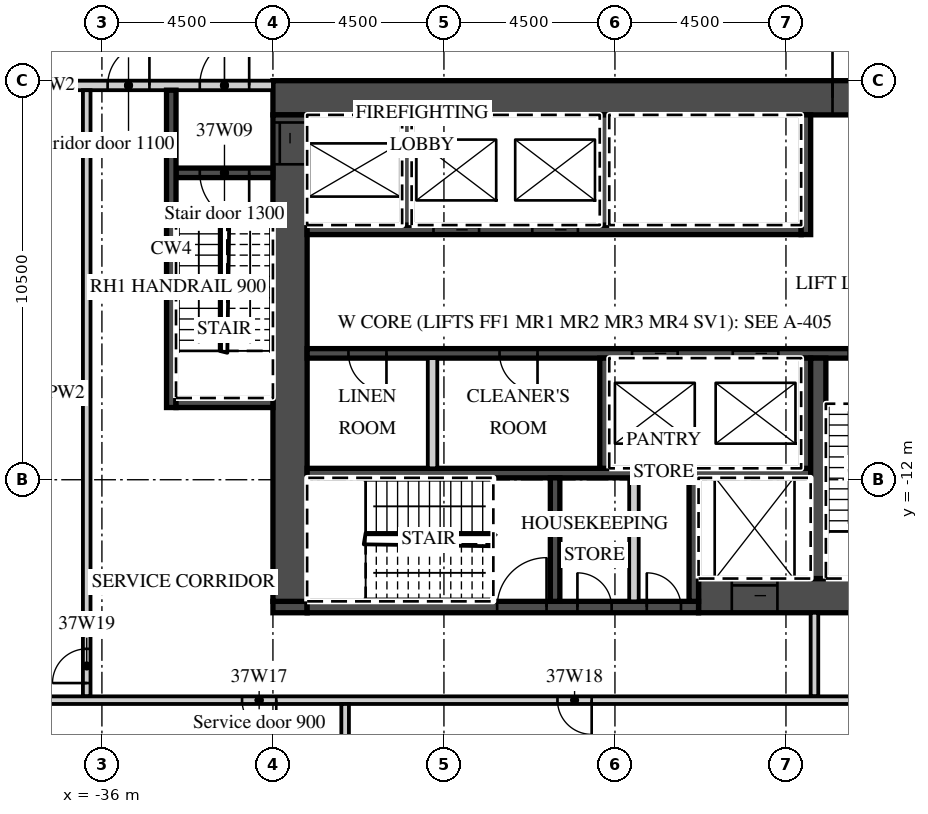
"""IFC4 building model, lengths in metres.
Left out: names, types, materials, properties, quantities, classifications, styles, units other than length and angle.
Written with IfcOpenShell. Run it as: python <this file> out.ifc"""

import sys

from ifc_helpers import new_model, si_unit, direction, frame, frame_2d, origin, place, context, subcontext, project, spatial, rectangle, extrude, element, fill, save


model = new_model("IFC4")
c1 = context("Model", 3, precision=1e-05, world=origin(), true_north=direction((0.0, 1.0)))
c2 = subcontext(c1, "Body", "Model", "MODEL_VIEW")
j1 = project(units=[si_unit("LENGTHUNIT", "METRE"), si_unit("PLANEANGLEUNIT", "RADIAN")], contexts=[c1])
p1 = place(None, origin())
s1 = spatial("IfcSite", under=j1, at=p1, CompositionType="ELEMENT")
p2 = place(p1, origin())
s2 = spatial("IfcBuilding", under=s1, at=p2, CompositionType="ELEMENT")
p3 = place(p2, frame((0.0, 0.0, 162.4)))
s3 = spatial("IfcBuildingStorey", under=s2, at=p3, CompositionType="ELEMENT", Elevation=162.4)
p4 = place(p3, frame((-31.5, -1.95, 0.0), z_axis=(0.0, 0.0, 1.0), x_axis=(1.0, 0.0, 0.0)))
e1 = element("IfcWall", 1, at=p4, inside=s3, PredefinedType="SHEAR", context=c2, shape_type="SweptSolid", body=[
    extrude(rectangle(XDim=18.0, YDim=0.9, at=frame_2d((9.0, 0.0))), origin(), (0.0, 0.0, 1.0), 4.22),
])
p5 = place(p4, frame((14.725, 0.0, 0.0)))
e2 = element("IfcOpeningElement", 2, at=p5, cuts=e1, PredefinedType="OPENING", context=c2, shape_type="SweptSolid", body=[
    extrude(rectangle(XDim=1.8, YDim=2.1, at=frame_2d((0.9, 1.05))), frame((0.0, 0.46, 0.0), z_axis=(0.0, -1.0, 0.0), x_axis=(1.0, 0.0, 0.0)), (0.0, 0.0, 1.0), 0.92),
])
p6 = place(p3, frame((-20.3, -15.05, 0.0), z_axis=(0.0, 0.0, 1.0), x_axis=(1.0, 0.0, 0.0)))
e3 = element("IfcWall", 3, at=p6, inside=s3, PredefinedType="SHEAR", context=c2, shape_type="SweptSolid", body=[
    extrude(rectangle(XDim=6.8, YDim=0.9, at=frame_2d((3.4, 0.0))), origin(), (0.0, 0.0, 1.0), 4.22),
])
p7 = place(p6, frame((0.875, 0.0, 0.0)))
e4 = element("IfcOpeningElement", 4, at=p7, cuts=e3, PredefinedType="OPENING", context=c2, shape_type="SweptSolid", body=[
    extrude(rectangle(XDim=1.2, YDim=2.1, at=frame_2d((0.6, 1.05))), frame((0.0, 0.46, 0.0), z_axis=(0.0, -1.0, 0.0), x_axis=(1.0, 0.0, 0.0)), (0.0, 0.0, 1.0), 0.92),
])
p8 = place(p3, frame((-31.5, -15.35, 0.0), z_axis=(0.0, 0.0, 1.0), x_axis=(1.0, 0.0, 0.0)))
e5 = element("IfcWall", 5, at=p8, inside=s3, PredefinedType="SHEAR", context=c2, shape_type="SweptSolid", body=[
    extrude(rectangle(XDim=0.9, YDim=0.3, at=frame_2d((0.45, 0.0))), origin(), (0.0, 0.0, 1.0), 4.22),
])
p9 = place(p3, frame((-30.6, -15.35, 0.0), z_axis=(0.0, 0.0, 1.0), x_axis=(1.0, 0.0, 0.0)))
e6 = element("IfcWall", 6, at=p9, inside=s3, PredefinedType="SHEAR", context=c2, shape_type="SweptSolid", body=[
    extrude(rectangle(XDim=10.3, YDim=0.3, at=frame_2d((5.15, 0.0))), origin(), (0.0, 0.0, 1.0), 4.22),
])
p10 = place(p9, frame((5.0, 0.0, 0.0)))
e7 = element("IfcOpeningElement", 7, at=p10, cuts=e6, PredefinedType="OPENING", context=c2, shape_type="SweptSolid", body=[
    extrude(rectangle(XDim=1.3, YDim=2.1, at=frame_2d((0.65, 1.05))), frame((0.0, 0.16, 0.0), z_axis=(0.0, -1.0, 0.0), x_axis=(1.0, 0.0, 0.0)), (0.0, 0.0, 1.0), 0.32),
])
p11 = place(p9, frame((7.113, 0.0, 0.0)))
e8 = element("IfcOpeningElement", 8, at=p11, cuts=e6, PredefinedType="OPENING", context=c2, shape_type="SweptSolid", body=[
    extrude(rectangle(XDim=0.9, YDim=2.1, at=frame_2d((0.45, 1.05))), frame((0.0, 0.16, 0.0), z_axis=(0.0, -1.0, 0.0), x_axis=(1.0, 0.0, 0.0)), (0.0, 0.0, 1.0), 0.32),
])
p12 = place(p9, frame((8.938, 0.0, 0.0)))
e9 = element("IfcOpeningElement", 9, at=p12, cuts=e6, PredefinedType="OPENING", context=c2, shape_type="SweptSolid", body=[
    extrude(rectangle(XDim=0.9, YDim=2.1, at=frame_2d((0.45, 1.05))), frame((0.0, 0.16, 0.0), z_axis=(0.0, -1.0, 0.0), x_axis=(1.0, 0.0, 0.0)), (0.0, 0.0, 1.0), 0.32),
])
p13 = place(p3, frame((-31.05, -15.2, 0.0), z_axis=(0.0, 0.0, 1.0), x_axis=(0.0, 1.0, 0.0)))
e10 = element("IfcWall", 10, at=p13, inside=s3, PredefinedType="SHEAR", context=c2, shape_type="SweptSolid", body=[
    extrude(rectangle(XDim=12.8, YDim=0.9, at=frame_2d((6.4, 0.0))), origin(), (0.0, 0.0, 1.0), 4.22),
])
p14 = place(p13, frame((11.5, 0.0, 0.0)))
e11 = element("IfcOpeningElement", 11, at=p14, cuts=e10, PredefinedType="OPENING", context=c2, shape_type="SweptSolid", body=[
    extrude(rectangle(XDim=1.1, YDim=2.1, at=frame_2d((0.55, 1.05))), frame((0.0, 0.46, 0.0), z_axis=(0.0, -1.0, 0.0), x_axis=(1.0, 0.0, 0.0)), (0.0, 0.0, 1.0), 0.92),
])
p15 = place(p3, frame((-30.6, -5.425, 0.0), z_axis=(0.0, 0.0, 1.0), x_axis=(1.0, 0.0, 0.0)))
e12 = element("IfcWall", 12, at=p15, inside=s3, PredefinedType="SHEAR", context=c2, shape_type="SweptSolid", body=[
    extrude(rectangle(XDim=13.0, YDim=0.25, at=frame_2d((6.5, 0.0))), origin(), (0.0, 0.0, 1.0), 4.22),
])
p16 = place(p15, frame((3.325, 0.0, 0.0)))
e13 = element("IfcOpeningElement", 13, at=p16, cuts=e12, PredefinedType="OPENING", context=c2, shape_type="SweptSolid", body=[
    extrude(rectangle(XDim=1.2, YDim=2.1, at=frame_2d((0.6, 1.05))), frame((0.0, 0.135, 0.0), z_axis=(0.0, -1.0, 0.0), x_axis=(1.0, 0.0, 0.0)), (0.0, 0.0, 1.0), 0.27),
])
p17 = place(p15, frame((5.925, 0.0, 0.0)))
e14 = element("IfcOpeningElement", 14, at=p17, cuts=e12, PredefinedType="OPENING", context=c2, shape_type="SweptSolid", body=[
    extrude(rectangle(XDim=1.2, YDim=2.1, at=frame_2d((0.6, 1.05))), frame((0.0, 0.135, 0.0), z_axis=(0.0, -1.0, 0.0), x_axis=(1.0, 0.0, 0.0)), (0.0, 0.0, 1.0), 0.27),
])
p18 = place(p3, frame((-17.475, -5.55, 0.0), z_axis=(0.0, 0.0, 1.0), x_axis=(0.0, 1.0, 0.0)))
e15 = element("IfcWall", 15, at=p18, inside=s3, PredefinedType="SHEAR", context=c2, shape_type="SweptSolid", body=[
    extrude(rectangle(XDim=3.15, YDim=0.25, at=frame_2d((1.575, 0.0))), origin(), (0.0, 0.0, 1.0), 4.22),
])
for number, where, z_axis, x_axis in (
    (16, (-27.975, -5.3, 0.0), (0.0, 0.0, 1.0), (0.0, 1.0, 0.0)),
    (17, (-22.775, -5.3, 0.0), (0.0, 0.0, 1.0), (0.0, 1.0, 0.0)),
):
    element("IfcWall", number, at=place(p3, frame(where, z_axis=z_axis, x_axis=x_axis)), inside=s3, PredefinedType="SHEAR", context=c2, shape_type="SweptSolid", body=[
        extrude(rectangle(XDim=2.9, YDim=0.25, at=frame_2d((1.45, 0.0))), origin(), (0.0, 0.0, 1.0), 4.22),
    ])
p19 = place(p3, frame((-30.6, -8.675, 0.0), z_axis=(0.0, 0.0, 1.0), x_axis=(1.0, 0.0, 0.0)))
e18 = element("IfcWall", 18, at=p19, inside=s3, PredefinedType="SHEAR", context=c2, shape_type="SweptSolid", body=[
    extrude(rectangle(XDim=16.2, YDim=0.25, at=frame_2d((8.1, 0.0))), origin(), (0.0, 0.0, 1.0), 4.22),
])
p20 = place(p19, frame((8.55, 0.0, 0.0)))
e19 = element("IfcOpeningElement", 19, at=p20, cuts=e18, PredefinedType="OPENING", context=c2, shape_type="SweptSolid", body=[
    extrude(rectangle(XDim=1.2, YDim=2.1, at=frame_2d((0.6, 1.05))), frame((0.0, 0.135, 0.0), z_axis=(0.0, -1.0, 0.0), x_axis=(1.0, 0.0, 0.0)), (0.0, 0.0, 1.0), 0.27),
])
p21 = place(p19, frame((11.2, 0.0, 0.0)))
e20 = element("IfcOpeningElement", 20, at=p21, cuts=e18, PredefinedType="OPENING", context=c2, shape_type="SweptSolid", body=[
    extrude(rectangle(XDim=1.2, YDim=2.1, at=frame_2d((0.6, 1.05))), frame((0.0, 0.135, 0.0), z_axis=(0.0, -1.0, 0.0), x_axis=(1.0, 0.0, 0.0)), (0.0, 0.0, 1.0), 0.27),
])
p22 = place(p19, frame((14.25, 0.0, 0.0)))
e21 = element("IfcOpeningElement", 21, at=p22, cuts=e18, PredefinedType="OPENING", context=c2, shape_type="SweptSolid", body=[
    extrude(rectangle(XDim=1.3, YDim=2.1, at=frame_2d((0.65, 1.05))), frame((0.0, 0.135, 0.0), z_axis=(0.0, -1.0, 0.0), x_axis=(1.0, 0.0, 0.0)), (0.0, 0.0, 1.0), 0.27),
])
p23 = place(p19, frame((1.087, 0.0, 0.0)))
e22 = element("IfcOpeningElement", 22, at=p23, cuts=e18, PredefinedType="OPENING", context=c2, shape_type="SweptSolid", body=[
    extrude(rectangle(XDim=1.0, YDim=2.1, at=frame_2d((0.5, 1.05))), frame((0.0, 0.135, 0.0), z_axis=(0.0, -1.0, 0.0), x_axis=(1.0, 0.0, 0.0)), (0.0, 0.0, 1.0), 0.27),
])
p24 = place(p19, frame((5.062, 0.0, 0.0)))
e23 = element("IfcOpeningElement", 23, at=p24, cuts=e18, PredefinedType="OPENING", context=c2, shape_type="SweptSolid", body=[
    extrude(rectangle(XDim=1.0, YDim=2.1, at=frame_2d((0.5, 1.05))), frame((0.0, 0.135, 0.0), z_axis=(0.0, -1.0, 0.0), x_axis=(1.0, 0.0, 0.0)), (0.0, 0.0, 1.0), 0.27),
])
p25 = place(p3, frame((-30.6, -11.825, 0.0), z_axis=(0.0, 0.0, 1.0), x_axis=(1.0, 0.0, 0.0)))
e24 = element("IfcWall", 24, at=p25, inside=s3, PredefinedType="SHEAR", context=c2, shape_type="SweptSolid", body=[
    extrude(rectangle(XDim=13.25, YDim=0.25, at=frame_2d((6.625, 0.0))), origin(), (0.0, 0.0, 1.0), 4.22),
])
for number, where, z_axis, x_axis in (
    (25, (-17.475, -11.7, 0.0), (0.0, 0.0, 1.0), (0.0, 1.0, 0.0)),
    (26, (-22.775, -11.7, 0.0), (0.0, 0.0, 1.0), (0.0, 1.0, 0.0)),
):
    element("IfcWall", number, at=place(p3, frame(where, z_axis=z_axis, x_axis=x_axis)), inside=s3, PredefinedType="SHEAR", context=c2, shape_type="SweptSolid", body=[
        extrude(rectangle(XDim=2.9, YDim=0.25, at=frame_2d((1.45, 0.0))), origin(), (0.0, 0.0, 1.0), 4.22),
    ])
p26 = place(p3, frame((-27.3, -11.7, 0.0), z_axis=(0.0, 0.0, 1.0), x_axis=(0.0, 1.0, 0.0)))
e27 = element("IfcWall", 27, at=p26, inside=s3, PredefinedType="PARTITIONING", context=c2, shape_type="SweptSolid", body=[
    extrude(rectangle(XDim=2.9, YDim=0.25, at=frame_2d((1.45, 0.0))), origin(), (0.0, 0.0, 1.0), 4.22),
])
p27 = place(p3, frame((-17.15, -14.6, 0.0), z_axis=(0.0, 0.0, 1.0), x_axis=(0.0, 1.0, 0.0)))
e28 = element("IfcWall", 28, at=p27, inside=s3, PredefinedType="SHEAR", context=c2, shape_type="SweptSolid", body=[
    extrude(rectangle(XDim=5.8, YDim=0.4, at=frame_2d((2.9, 0.0))), origin(), (0.0, 0.0, 1.0), 4.22),
])
for number, where, z_axis, x_axis in (
    (29, (-20.425, -15.2, 0.0), (0.0, 0.0, 1.0), (0.0, 1.0, 0.0)),
    (30, (-24.075, -15.2, 0.0), (0.0, 0.0, 1.0), (0.0, 1.0, 0.0)),
):
    element("IfcWall", number, at=place(p3, frame(where, z_axis=z_axis, x_axis=x_axis)), inside=s3, PredefinedType="SHEAR", context=c2, shape_type="SweptSolid", body=[
        extrude(rectangle(XDim=3.25, YDim=0.25, at=frame_2d((1.625, 0.0))), origin(), (0.0, 0.0, 1.0), 4.22),
    ])
p28 = place(p3, frame((-22.0, -15.2, 0.0), z_axis=(0.0, 0.0, 1.0), x_axis=(0.0, 1.0, 0.0)))
e31 = element("IfcWall", 31, at=p28, inside=s3, PredefinedType="PARTITIONING", context=c2, shape_type="SweptSolid", body=[
    extrude(rectangle(XDim=3.25, YDim=0.25, at=frame_2d((1.625, 0.0))), origin(), (0.0, 0.0, 1.0), 4.22),
])
p29 = place(p3, frame((-42.933, -1.625, 0.0), z_axis=(0.0, 0.0, 1.0), x_axis=(1.0, 0.0, 0.0)))
e32 = element("IfcWall", 32, at=p29, inside=s3, PredefinedType="PARTITIONING", context=c2, shape_type="SweptSolid", body=[
    extrude(rectangle(XDim=11.433, YDim=0.25, at=frame_2d((5.716, 0.0))), origin(), (0.0, 0.0, 1.0), 4.22),
])
p30 = place(p29, frame((9.508, 0.0, 0.0)))
e33 = element("IfcOpeningElement", 33, at=p30, cuts=e32, PredefinedType="OPENING", context=c2, shape_type="SweptSolid", body=[
    extrude(rectangle(XDim=1.3, YDim=2.1, at=frame_2d((0.65, 1.05))), frame((0.0, 0.135, 0.0), z_axis=(0.0, -1.0, 0.0), x_axis=(1.0, 0.0, 0.0)), (0.0, 0.0, 1.0), 0.27),
])
p31 = place(p29, frame((7.083, 0.0, 0.0)))
e34 = element("IfcOpeningElement", 34, at=p31, cuts=e32, PredefinedType="OPENING", context=c2, shape_type="SweptSolid", body=[
    extrude(rectangle(XDim=1.1, YDim=2.1, at=frame_2d((0.55, 1.05))), frame((0.0, 0.135, 0.0), z_axis=(0.0, -1.0, 0.0), x_axis=(1.0, 0.0, 0.0)), (0.0, 0.0, 1.0), 0.27),
])
p32 = place(p3, frame((-34.05, -3.925, 0.0), z_axis=(0.0, 0.0, 1.0), x_axis=(1.0, 0.0, 0.0)))
e35 = element("IfcWall", 35, at=p32, inside=s3, PredefinedType="SHEAR", context=c2, shape_type="SweptSolid", body=[
    extrude(rectangle(XDim=2.55, YDim=0.25, at=frame_2d((1.275, 0.0))), origin(), (0.0, 0.0, 1.0), 4.22),
])
p33 = place(p32, frame((0.625, 0.0, 0.0)))
e36 = element("IfcOpeningElement", 36, at=p33, cuts=e35, PredefinedType="OPENING", context=c2, shape_type="SweptSolid", body=[
    extrude(rectangle(XDim=1.3, YDim=2.1, at=frame_2d((0.65, 1.05))), frame((0.0, 0.135, 0.0), z_axis=(0.0, -1.0, 0.0), x_axis=(1.0, 0.0, 0.0)), (0.0, 0.0, 1.0), 0.27),
])
p34 = place(p3, frame((-34.175, -10.1, 0.0), z_axis=(0.0, 0.0, 1.0), x_axis=(0.0, 1.0, 0.0)))
e37 = element("IfcWall", 37, at=p34, inside=s3, PredefinedType="SHEAR", context=c2, shape_type="SweptSolid", body=[
    extrude(rectangle(XDim=8.35, YDim=0.25, at=frame_2d((4.175, 0.0))), origin(), (0.0, 0.0, 1.0), 4.22),
])
p35 = place(p3, frame((-34.05, -9.975, 0.0), z_axis=(0.0, 0.0, 1.0), x_axis=(1.0, 0.0, 0.0)))
e38 = element("IfcWall", 38, at=p35, inside=s3, PredefinedType="SHEAR", context=c2, shape_type="SweptSolid", body=[
    extrude(rectangle(XDim=2.55, YDim=0.25, at=frame_2d((1.275, 0.0))), origin(), (0.0, 0.0, 1.0), 4.22),
])
p36 = place(p3, frame((-17.25, -17.7, 0.0), z_axis=(0.0, 0.0, 1.0), x_axis=(0.0, 1.0, 0.0)))
e39 = element("IfcWall", 39, at=p36, inside=s3, PredefinedType="PARTITIONING", context=c2, shape_type="SweptSolid", body=[
    extrude(rectangle(XDim=2.2, YDim=0.2, at=frame_2d((1.1, 0.0))), origin(), (0.0, 0.0, 1.0), 4.22),
])
p37 = place(p3, frame((-36.4, -17.7, 0.0), z_axis=(0.0, 0.0, 1.0), x_axis=(0.0, 1.0, 0.0)))
e40 = element("IfcWall", 40, at=p37, inside=s3, PredefinedType="PARTITIONING", context=c2, shape_type="SweptSolid", body=[
    extrude(rectangle(XDim=15.95, YDim=0.2, at=frame_2d((7.975, 0.0))), origin(), (0.0, 0.0, 1.0), 4.22),
])
p38 = place(p37, frame((0.35, 0.0, 0.0)))
e41 = element("IfcOpeningElement", 41, at=p38, cuts=e40, PredefinedType="OPENING", context=c2, shape_type="SweptSolid", body=[
    extrude(rectangle(XDim=0.9, YDim=2.1, at=frame_2d((0.45, 1.05))), frame((0.0, 0.11, 0.0), z_axis=(0.0, -1.0, 0.0), x_axis=(1.0, 0.0, 0.0)), (0.0, 0.0, 1.0), 0.22),
])
p39 = place(p3, frame((-41.375, -17.8, 0.0), z_axis=(0.0, 0.0, 1.0), x_axis=(1.0, 0.0, 0.0)))
e42 = element("IfcWall", 42, at=p39, inside=s3, PredefinedType="PARTITIONING", context=c2, shape_type="SweptSolid", body=[
    extrude(rectangle(XDim=27.775, YDim=0.2, at=frame_2d((13.888, 0.0))), origin(), (0.0, 0.0, 1.0), 4.22),
])
p40 = place(p39, frame((9.063, 0.0, 0.0)))
e43 = element("IfcOpeningElement", 43, at=p40, cuts=e42, PredefinedType="OPENING", context=c2, shape_type="SweptSolid", body=[
    extrude(rectangle(XDim=0.9, YDim=2.1, at=frame_2d((0.45, 1.05))), frame((0.0, 0.11, 0.0), z_axis=(0.0, -1.0, 0.0), x_axis=(1.0, 0.0, 0.0)), (0.0, 0.0, 1.0), 0.22),
])
p41 = place(p39, frame((17.363, 0.0, 0.0)))
e44 = element("IfcOpeningElement", 44, at=p41, cuts=e42, PredefinedType="OPENING", context=c2, shape_type="SweptSolid", body=[
    extrude(rectangle(XDim=0.9, YDim=2.1, at=frame_2d((0.45, 1.05))), frame((0.0, 0.11, 0.0), z_axis=(0.0, -1.0, 0.0), x_axis=(1.0, 0.0, 0.0)), (0.0, 0.0, 1.0), 0.22),
])
p42 = place(p3, frame((-29.6, -23.852, 0.0), z_axis=(0.0, 0.0, 1.0), x_axis=(0.0, 1.0, 0.0)))
e45 = element("IfcWall", 45, at=p42, inside=s3, PredefinedType="PARTITIONING", context=c2, shape_type="SweptSolid", body=[
    extrude(rectangle(XDim=5.952, YDim=0.2, at=frame_2d((2.976, 0.0))), origin(), (0.0, 0.0, 1.0), 4.22),
])
p43 = place(p20, origin())
e46 = element("IfcDoor", 46, at=p43, inside=s3, OperationType="SLIDING_TO_LEFT", PredefinedType="DOOR", context=c2, shape_type="SweptSolid", body=[
    extrude(rectangle(XDim=1.2, YDim=2.1, at=frame_2d((0.6, 1.05))), frame((0.0, 0.025, 0.0), z_axis=(0.0, -1.0, 0.0), x_axis=(1.0, 0.0, 0.0)), (0.0, 0.0, 1.0), 0.05),
])
fill(e19, e46)
p44 = place(p21, origin())
e47 = element("IfcDoor", 47, at=p44, inside=s3, OperationType="SLIDING_TO_RIGHT", PredefinedType="DOOR", context=c2, shape_type="SweptSolid", body=[
    extrude(rectangle(XDim=1.2, YDim=2.1, at=frame_2d((0.6, 1.05))), frame((0.0, 0.025, 0.0), z_axis=(0.0, -1.0, 0.0), x_axis=(1.0, 0.0, 0.0)), (0.0, 0.0, 1.0), 0.05),
])
fill(e20, e47)
p45 = place(p16, origin())
e48 = element("IfcDoor", 48, at=p45, inside=s3, OperationType="SLIDING_TO_RIGHT", PredefinedType="DOOR", context=c2, shape_type="SweptSolid", body=[
    extrude(rectangle(XDim=1.2, YDim=2.1, at=frame_2d((0.6, 1.05))), frame((0.0, 0.025, 0.0), z_axis=(0.0, -1.0, 0.0), x_axis=(1.0, 0.0, 0.0)), (0.0, 0.0, 1.0), 0.05),
])
fill(e13, e48)
p46 = place(p17, origin())
e49 = element("IfcDoor", 49, at=p46, inside=s3, OperationType="SLIDING_TO_RIGHT", PredefinedType="DOOR", context=c2, shape_type="SweptSolid", body=[
    extrude(rectangle(XDim=1.2, YDim=2.1, at=frame_2d((0.6, 1.05))), frame((0.0, 0.025, 0.0), z_axis=(0.0, -1.0, 0.0), x_axis=(1.0, 0.0, 0.0)), (0.0, 0.0, 1.0), 0.05),
])
fill(e14, e49)
p47 = place(p7, origin())
e50 = element("IfcDoor", 50, at=p47, inside=s3, OperationType="SLIDING_TO_LEFT", PredefinedType="DOOR", context=c2, shape_type="SweptSolid", body=[
    extrude(rectangle(XDim=1.2, YDim=2.1, at=frame_2d((0.6, 1.05))), frame((0.0, 0.025, 0.0), z_axis=(0.0, -1.0, 0.0), x_axis=(1.0, 0.0, 0.0)), (0.0, 0.0, 1.0), 0.05),
])
fill(e4, e50)
p48 = place(p14, origin())
e51 = element("IfcDoor", 51, at=p48, inside=s3, OperationType="SLIDING_TO_RIGHT", PredefinedType="DOOR", context=c2, shape_type="SweptSolid", body=[
    extrude(rectangle(XDim=1.1, YDim=2.1, at=frame_2d((0.55, 1.05))), frame((0.0, 0.025, 0.0), z_axis=(0.0, -1.0, 0.0), x_axis=(1.0, 0.0, 0.0)), (0.0, 0.0, 1.0), 0.05),
])
fill(e11, e51)
p49 = place(p5, origin())
e52 = element("IfcDoor", 52, at=p49, inside=s3, OperationType="DOUBLE_DOOR_DOUBLE_SWING", PredefinedType="DOOR", context=c2, shape_type="SweptSolid", body=[
    extrude(rectangle(XDim=1.8, YDim=2.1, at=frame_2d((0.9, 1.05))), frame((0.0, 0.025, 0.0), z_axis=(0.0, -1.0, 0.0), x_axis=(1.0, 0.0, 0.0)), (0.0, 0.0, 1.0), 0.05),
])
fill(e2, e52)
p50 = place(p30, origin())
e53 = element("IfcDoor", 53, at=p50, inside=s3, OperationType="SINGLE_SWING_RIGHT", PredefinedType="DOOR", context=c2, shape_type="SweptSolid", body=[
    extrude(rectangle(XDim=1.3, YDim=2.1, at=frame_2d((0.65, 1.05))), frame((0.0, 0.025, 0.0), z_axis=(0.0, -1.0, 0.0), x_axis=(1.0, 0.0, 0.0)), (0.0, 0.0, 1.0), 0.05),
])
fill(e33, e53)
p51 = place(p33, origin())
e54 = element("IfcDoor", 54, at=p51, inside=s3, OperationType="SINGLE_SWING_RIGHT", PredefinedType="DOOR", context=c2, shape_type="SweptSolid", body=[
    extrude(rectangle(XDim=1.3, YDim=2.1, at=frame_2d((0.65, 1.05))), frame((0.0, 0.025, 0.0), z_axis=(0.0, -1.0, 0.0), x_axis=(1.0, 0.0, 0.0)), (0.0, 0.0, 1.0), 0.05),
])
fill(e36, e54)
p52 = place(p31, origin())
e55 = element("IfcDoor", 55, at=p52, inside=s3, OperationType="SINGLE_SWING_RIGHT", PredefinedType="DOOR", context=c2, shape_type="SweptSolid", body=[
    extrude(rectangle(XDim=1.1, YDim=2.1, at=frame_2d((0.55, 1.05))), frame((0.0, 0.025, 0.0), z_axis=(0.0, -1.0, 0.0), x_axis=(1.0, 0.0, 0.0)), (0.0, 0.0, 1.0), 0.05),
])
fill(e34, e55)
p53 = place(p22, origin())
e56 = element("IfcDoor", 56, at=p53, inside=s3, OperationType="SINGLE_SWING_RIGHT", PredefinedType="DOOR", context=c2, shape_type="SweptSolid", body=[
    extrude(rectangle(XDim=1.3, YDim=2.1, at=frame_2d((0.65, 1.05))), frame((0.0, 0.025, 0.0), z_axis=(0.0, -1.0, 0.0), x_axis=(1.0, 0.0, 0.0)), (0.0, 0.0, 1.0), 0.05),
])
fill(e21, e56)
p54 = place(p10, origin())
e57 = element("IfcDoor", 57, at=p54, inside=s3, OperationType="SINGLE_SWING_RIGHT", PredefinedType="DOOR", context=c2, shape_type="SweptSolid", body=[
    extrude(rectangle(XDim=1.3, YDim=2.1, at=frame_2d((0.65, 1.05))), frame((0.0, 0.025, 0.0), z_axis=(0.0, -1.0, 0.0), x_axis=(1.0, 0.0, 0.0)), (0.0, 0.0, 1.0), 0.05),
])
fill(e7, e57)
p55 = place(p11, origin())
e58 = element("IfcDoor", 58, at=p55, inside=s3, OperationType="SINGLE_SWING_LEFT", PredefinedType="DOOR", context=c2, shape_type="SweptSolid", body=[
    extrude(rectangle(XDim=0.9, YDim=2.1, at=frame_2d((0.45, 1.05))), frame((0.0, 0.025, 0.0), z_axis=(0.0, -1.0, 0.0), x_axis=(1.0, 0.0, 0.0)), (0.0, 0.0, 1.0), 0.05),
])
fill(e8, e58)
p56 = place(p12, origin())
e59 = element("IfcDoor", 59, at=p56, inside=s3, OperationType="SINGLE_SWING_LEFT", PredefinedType="DOOR", context=c2, shape_type="SweptSolid", body=[
    extrude(rectangle(XDim=0.9, YDim=2.1, at=frame_2d((0.45, 1.05))), frame((0.0, 0.025, 0.0), z_axis=(0.0, -1.0, 0.0), x_axis=(1.0, 0.0, 0.0)), (0.0, 0.0, 1.0), 0.05),
])
fill(e9, e59)
p57 = place(p23, origin())
e60 = element("IfcDoor", 60, at=p57, inside=s3, OperationType="SINGLE_SWING_RIGHT", PredefinedType="DOOR", context=c2, shape_type="SweptSolid", body=[
    extrude(rectangle(XDim=1.0, YDim=2.1, at=frame_2d((0.5, 1.05))), frame((0.0, 0.025, 0.0), z_axis=(0.0, -1.0, 0.0), x_axis=(1.0, 0.0, 0.0)), (0.0, 0.0, 1.0), 0.05),
])
fill(e22, e60)
p58 = place(p24, origin())
e61 = element("IfcDoor", 61, at=p58, inside=s3, OperationType="SINGLE_SWING_RIGHT", PredefinedType="DOOR", context=c2, shape_type="SweptSolid", body=[
    extrude(rectangle(XDim=1.0, YDim=2.1, at=frame_2d((0.5, 1.05))), frame((0.0, 0.025, 0.0), z_axis=(0.0, -1.0, 0.0), x_axis=(1.0, 0.0, 0.0)), (0.0, 0.0, 1.0), 0.05),
])
fill(e23, e61)
p59 = place(p40, origin())
e62 = element("IfcDoor", 62, at=p59, inside=s3, OperationType="SINGLE_SWING_RIGHT", PredefinedType="DOOR", context=c2, shape_type="SweptSolid", body=[
    extrude(rectangle(XDim=0.9, YDim=2.1, at=frame_2d((0.45, 1.05))), frame((0.0, 0.025, 0.0), z_axis=(0.0, -1.0, 0.0), x_axis=(1.0, 0.0, 0.0)), (0.0, 0.0, 1.0), 0.05),
])
fill(e43, e62)
p60 = place(p41, origin())
e63 = element("IfcDoor", 63, at=p60, inside=s3, OperationType="SINGLE_SWING_RIGHT", PredefinedType="DOOR", context=c2, shape_type="SweptSolid", body=[
    extrude(rectangle(XDim=0.9, YDim=2.1, at=frame_2d((0.45, 1.05))), frame((0.0, 0.025, 0.0), z_axis=(0.0, -1.0, 0.0), x_axis=(1.0, 0.0, 0.0)), (0.0, 0.0, 1.0), 0.05),
])
fill(e44, e63)
p61 = place(p38, origin())
e64 = element("IfcDoor", 64, at=p61, inside=s3, OperationType="SINGLE_SWING_LEFT", PredefinedType="DOOR", context=c2, shape_type="SweptSolid", body=[
    extrude(rectangle(XDim=0.9, YDim=2.1, at=frame_2d((0.45, 1.05))), frame((0.0, 0.025, 0.0), z_axis=(0.0, -1.0, 0.0), x_axis=(1.0, 0.0, 0.0)), (0.0, 0.0, 1.0), 0.05),
])
fill(e41, e64)
save(model, sys.argv[1])
